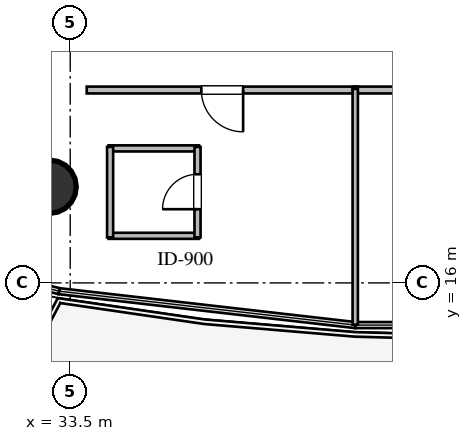
"""IFC4 building model, lengths in metres.
Left out: names, types, materials, properties, quantities, classifications, styles, units other than length and angle.
Written with IfcOpenShell. Run it as: python <this file> out.ifc"""

import sys

from ifc_helpers import new_model, si_unit, direction, frame, frame_2d, origin, origin_2d, place, context, subcontext, project, spatial, rectangle, circle, extrude, element, fill, save


model = new_model("IFC4")
c1 = context("Model", 3, precision=1e-05, world=origin(), true_north=direction((0.0, 1.0)))
c2 = subcontext(c1, "Body", "Model", "MODEL_VIEW")
j1 = project(units=[si_unit("LENGTHUNIT", "METRE"), si_unit("PLANEANGLEUNIT", "RADIAN")], contexts=[c1])
p1 = place(None, origin())
s1 = spatial("IfcSite", under=j1, at=p1, CompositionType="ELEMENT")
p2 = place(p1, origin())
s2 = spatial("IfcBuilding", under=s1, at=p2, CompositionType="ELEMENT")
p3 = place(p2, frame((0.0, 0.0, 27.6)))
s3 = spatial("IfcBuildingStorey", under=s2, at=p3, CompositionType="ELEMENT", Elevation=27.6)
p4 = place(p3, frame((32.96, 18.53, 0.0), z_axis=(0.0, 0.0, 1.0), x_axis=(1.0, 0.0, 0.0)))
e1 = element("IfcColumn", 1, at=p4, inside=s3, PredefinedType="COLUMN", context=c2, shape_type="SweptSolid", body=[
    extrude(circle(Radius=0.7, at=origin_2d()), origin(), (0.0, 0.0, 1.0), 3.6),
])
for number, where, z_axis, x_axis in (
    (2, (34.51, 17.239, 0.0), (0.0, 0.0, 1.0), (1.0, 0.0, 0.0)),
    (3, (34.51, 19.539, 0.0), (0.0, 0.0, 1.0), (1.0, 0.0, 0.0)),
):
    element("IfcWall", number, at=place(p3, frame(where, z_axis=z_axis, x_axis=x_axis)), inside=s3, PredefinedType="PLUMBINGWALL", context=c2, shape_type="SweptSolid", body=[
        extrude(rectangle(XDim=2.38, YDim=0.16, at=frame_2d((1.19, 0.0))), origin(), (0.0, 0.0, 1.0), 3.36),
    ])
p5 = place(p3, frame((34.55, 17.199, 0.0), z_axis=(0.0, 0.0, 1.0), x_axis=(0.0, 1.0, 0.0)))
e4 = element("IfcWall", 4, at=p5, inside=s3, PredefinedType="PLUMBINGWALL", context=c2, shape_type="SweptSolid", body=[
    extrude(rectangle(XDim=2.38, YDim=0.16, at=frame_2d((1.19, 0.0))), origin(), (0.0, 0.0, 1.0), 3.36),
])
p6 = place(p3, frame((36.85, 17.199, 0.0), z_axis=(0.0, 0.0, 1.0), x_axis=(0.0, 1.0, 0.0)))
e5 = element("IfcWall", 5, at=p6, inside=s3, PredefinedType="PLUMBINGWALL", context=c2, shape_type="SweptSolid", body=[
    extrude(rectangle(XDim=2.38, YDim=0.16, at=frame_2d((1.19, 0.0))), origin(), (0.0, 0.0, 1.0), 3.36),
])
p7 = place(p6, frame((0.74, 0.0, 0.0)))
e6 = element("IfcOpeningElement", 6, at=p7, cuts=e5, PredefinedType="OPENING", context=c2, shape_type="SweptSolid", body=[
    extrude(rectangle(XDim=0.92, YDim=2.1, at=frame_2d((0.46, 1.05))), frame((0.0, 0.09, 0.0), z_axis=(0.0, -1.0, 0.0), x_axis=(1.0, 0.0, 0.0)), (0.0, 0.0, 1.0), 0.18),
])
p8 = place(p3, frame((41.065, 21.075, 0.0), z_axis=(0.0, 0.0, 1.0), x_axis=(-1.0, 0.0, 0.0)))
e7 = element("IfcWall", 7, at=p8, inside=s3, PredefinedType="PARTITIONING", context=c2, shape_type="SweptSolid", body=[
    extrude(rectangle(XDim=7.13, YDim=0.18, at=frame_2d((3.565, 0.0))), origin(), (0.0, 0.0, 1.0), 2.996),
])
p9 = place(p8, frame((3.015, 0.0, 0.0)))
e8 = element("IfcOpeningElement", 8, at=p9, cuts=e7, PredefinedType="OPENING", context=c2, shape_type="SweptSolid", body=[
    extrude(rectangle(XDim=1.1, YDim=2.1, at=frame_2d((0.55, 1.05))), frame((0.0, 0.1, 0.0), z_axis=(0.0, -1.0, 0.0), x_axis=(1.0, 0.0, 0.0)), (0.0, 0.0, 1.0), 0.2),
])
p10 = place(p3, frame((46.555, 21.075, 0.0), z_axis=(0.0, 0.0, 1.0), x_axis=(-1.0, 0.0, 0.0)))
e9 = element("IfcWall", 9, at=p10, inside=s3, PredefinedType="PARTITIONING", context=c2, shape_type="SweptSolid", body=[
    extrude(rectangle(XDim=5.62, YDim=0.18, at=frame_2d((2.81, 0.0))), origin(), (0.0, 0.0, 1.0), 3.36),
])
p11 = place(p10, frame((2.21, 0.0, 0.0)))
e10 = element("IfcOpeningElement", 10, at=p11, cuts=e9, PredefinedType="OPENING", context=c2, shape_type="SweptSolid", body=[
    extrude(rectangle(XDim=1.2, YDim=2.15, at=frame_2d((0.6, 1.075))), frame((0.0, 0.1, 0.0), z_axis=(0.0, -1.0, 0.0), x_axis=(1.0, 0.0, 0.0)), (0.0, 0.0, 1.0), 0.2),
])
p12 = place(p3, frame((41.0, 21.105, 0.0), z_axis=(0.0, 0.0, 1.0), x_axis=(0.0, -1.0, 0.0)))
e11 = element("IfcWall", 11, at=p12, inside=s3, PredefinedType="PARTITIONING", context=c2, shape_type="SweptSolid", body=[
    extrude(rectangle(XDim=6.205, YDim=0.14, at=frame_2d((3.103, 0.0))), origin(), (0.0, 0.0, 1.0), 3.36),
])
p13 = place(p7, origin())
e12 = element("IfcDoor", 12, at=p13, inside=s3, OperationType="SINGLE_SWING_LEFT", PredefinedType="DOOR", context=c2, shape_type="SweptSolid", body=[
    extrude(rectangle(XDim=0.92, YDim=2.1, at=frame_2d((0.46, 1.05))), frame((0.0, 0.025, 0.0), z_axis=(0.0, -1.0, 0.0), x_axis=(1.0, 0.0, 0.0)), (0.0, 0.0, 1.0), 0.05),
])
fill(e6, e12)
p14 = place(p9, origin())
e13 = element("IfcDoor", 13, at=p14, inside=s3, OperationType="SINGLE_SWING_LEFT", PredefinedType="DOOR", context=c2, shape_type="SweptSolid", body=[
    extrude(rectangle(XDim=1.1, YDim=2.1, at=frame_2d((0.55, 1.05))), frame((0.0, 0.025, 0.0), z_axis=(0.0, -1.0, 0.0), x_axis=(1.0, 0.0, 0.0)), (0.0, 0.0, 1.0), 0.05),
])
fill(e8, e13)
save(model, sys.argv[1])
